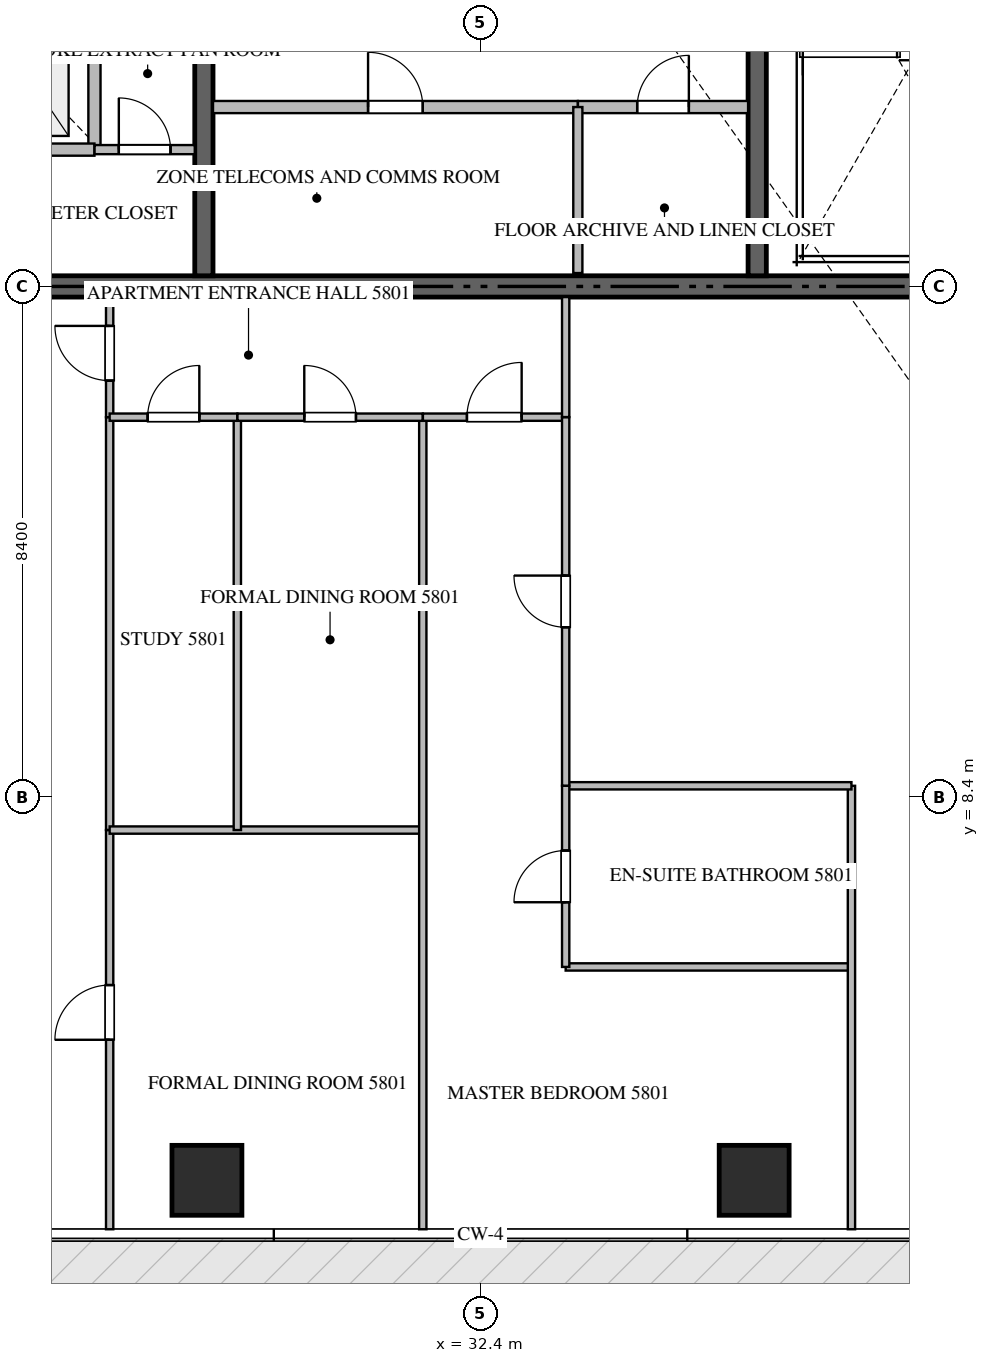
"""IFC4 building model, lengths in metres.
Left out: names, types, materials, properties, quantities, classifications, styles, units other than length and angle.
Written with IfcOpenShell. Run it as: python <this file> out.ifc"""

import sys

from ifc_helpers import new_model, si_unit, direction, frame, frame_2d, origin, origin_2d, place, context, subcontext, project, spatial, rectangle, extrude, source, transform, mapped, element, fill, save


model = new_model("IFC4")
c1 = context("Model", 3, precision=1e-05, world=origin(), true_north=direction((0.0, 1.0)))
c2 = subcontext(c1, "Body", "Model", "MODEL_VIEW")
j1 = project(units=[si_unit("LENGTHUNIT", "METRE"), si_unit("PLANEANGLEUNIT", "RADIAN")], contexts=[c1])
p1 = place(None, origin())
s1 = spatial("IfcSite", under=j1, at=p1, CompositionType="ELEMENT")
p2 = place(p1, origin())
s2 = spatial("IfcBuilding", under=s1, at=p2, CompositionType="ELEMENT")
p3 = place(p2, frame((0.0, 0.0, 233.55)))
s3 = spatial("IfcBuildingStorey", under=s2, at=p3, CompositionType="ELEMENT", Elevation=233.55)
p4 = place(p3, frame((23.4, 16.8, -0.26), z_axis=(0.0, 0.0, 1.0), x_axis=(1.0, 0.0, 0.0)))
e1 = element("IfcWall", 1, at=p4, inside=s3, PredefinedType="SHEAR", context=c2, shape_type="SweptSolid", body=[
    extrude(rectangle(XDim=18.0, YDim=0.35, at=frame_2d((9.0, 0.0))), origin(), (0.0, 0.0, 1.0), 3.848),
])
p5 = place(p3, frame((27.85, 16.975, -0.26), z_axis=(0.0, 0.0, 1.0), x_axis=(0.0, 1.0, 0.0)))
e2 = element("IfcWall", 2, at=p5, inside=s3, PredefinedType="SHEAR", context=c2, shape_type="SweptSolid", body=[
    extrude(rectangle(XDim=4.875, YDim=0.3, at=frame_2d((2.438, 0.0))), origin(), (0.0, 0.0, 1.0), 3.848),
])
p6 = place(p3, frame((36.95, 16.975, -0.26), z_axis=(0.0, 0.0, 1.0), x_axis=(0.0, 1.0, 0.0)))
e3 = element("IfcWall", 3, at=p6, inside=s3, PredefinedType="SHEAR", context=c2, shape_type="SweptSolid", body=[
    extrude(rectangle(XDim=8.375, YDim=0.3, at=frame_2d((4.188, 0.0))), origin(), (0.0, 0.0, 1.0), 3.848),
])
m1 = source(origin(), c2, "Body", "SweptSolid", [
    extrude(rectangle(XDim=1.15, YDim=1.15, at=origin_2d()), origin(), (0.0, 0.0, 1.0), 3.85),
])
for number, where, z_axis, x_axis in (
    (4, (27.9, 2.1, -0.26), (0.0, 0.0, 1.0), (1.0, 0.0, 0.0)),
    (5, (36.9, 2.1, -0.26), (0.0, 0.0, 1.0), (1.0, 0.0, 0.0)),
):
    element("IfcColumn", number, at=place(p3, frame(where, z_axis=z_axis, x_axis=x_axis)), inside=s3, PredefinedType="COLUMN", context=c2, shape_type="MappedRepresentation", body=[
        mapped(m1, transform((0.0, 0.0, 0.0), scale=1.0)),
    ])
p7 = place(p3, frame((26.05, 19.05, 0.0), z_axis=(0.0, 0.0, 1.0), x_axis=(0.0, 1.0, 0.0)))
e6 = element("IfcWall", 6, at=p7, inside=s3, PredefinedType="STANDARD", context=c2, shape_type="SweptSolid", body=[
    extrude(rectangle(XDim=2.5, YDim=0.2, at=frame_2d((1.25, 0.0))), origin(), (0.0, 0.0, 1.0), 3.59),
])
p8 = place(p3, frame((23.575, 19.05, 0.0), z_axis=(0.0, 0.0, 1.0), x_axis=(1.0, 0.0, 0.0)))
e7 = element("IfcWall", 7, at=p8, inside=s3, PredefinedType="STANDARD", context=c2, shape_type="SweptSolid", body=[
    extrude(rectangle(XDim=2.475, YDim=0.2, at=frame_2d((1.238, 0.0))), origin(), (0.0, 0.0, 1.0), 3.59),
])
p9 = place(p3, frame((26.052, 19.05, 0.0), z_axis=(0.0, 0.0, 1.0), x_axis=(1.0, 0.0, 0.0)))
e8 = element("IfcWall", 8, at=p9, inside=s3, PredefinedType="PARTITIONING", context=c2, shape_type="SweptSolid", body=[
    extrude(rectangle(XDim=1.648, YDim=0.15, at=frame_2d((0.824, 0.0))), origin(), (0.0, 0.0, 1.0), 3.59),
])
p10 = place(p9, frame((0.399, 0.0, 0.0)))
e9 = element("IfcOpeningElement", 9, at=p10, cuts=e8, PredefinedType="OPENING", context=c2, shape_type="SweptSolid", body=[
    extrude(rectangle(XDim=0.85, YDim=2.1, at=frame_2d((0.425, 1.05))), frame((0.0, 0.085, 0.0), z_axis=(0.0, -1.0, 0.0), x_axis=(1.0, 0.0, 0.0)), (0.0, 0.0, 1.0), 0.17),
])
p11 = place(p3, frame((28.0, 19.75, 0.0), z_axis=(0.0, 0.0, 1.0), x_axis=(1.0, 0.0, 0.0)))
e10 = element("IfcWall", 10, at=p11, inside=s3, PredefinedType="STANDARD", context=c2, shape_type="SweptSolid", body=[
    extrude(rectangle(XDim=6.0, YDim=0.2, at=frame_2d((3.0, 0.0))), origin(), (0.0, 0.0, 1.0), 3.59),
])
p12 = place(p11, frame((2.55, 0.0, 0.0)))
e11 = element("IfcOpeningElement", 11, at=p12, cuts=e10, PredefinedType="OPENING", context=c2, shape_type="SweptSolid", body=[
    extrude(rectangle(XDim=0.9, YDim=2.1, at=frame_2d((0.45, 1.05))), frame((0.0, 0.11, 0.0), z_axis=(0.0, -1.0, 0.0), x_axis=(1.0, 0.0, 0.0)), (0.0, 0.0, 1.0), 0.22),
])
p13 = place(p3, frame((34.002, 19.75, 0.0), z_axis=(0.0, 0.0, 1.0), x_axis=(1.0, 0.0, 0.0)))
e12 = element("IfcWall", 12, at=p13, inside=s3, PredefinedType="STANDARD", context=c2, shape_type="SweptSolid", body=[
    extrude(rectangle(XDim=2.798, YDim=0.2, at=frame_2d((1.399, 0.0))), origin(), (0.0, 0.0, 1.0), 3.59),
])
p14 = place(p13, frame((0.974, 0.0, 0.0)))
e13 = element("IfcOpeningElement", 13, at=p14, cuts=e12, PredefinedType="OPENING", context=c2, shape_type="SweptSolid", body=[
    extrude(rectangle(XDim=0.85, YDim=2.1, at=frame_2d((0.425, 1.05))), frame((0.0, 0.11, 0.0), z_axis=(0.0, -1.0, 0.0), x_axis=(1.0, 0.0, 0.0)), (0.0, 0.0, 1.0), 0.22),
])
p15 = place(p3, frame((34.0, 17.02, 0.0), z_axis=(0.0, 0.0, 1.0), x_axis=(0.0, 1.0, 0.0)))
e14 = element("IfcWall", 14, at=p15, inside=s3, PredefinedType="PARTITIONING", context=c2, shape_type="SweptSolid", body=[
    extrude(rectangle(XDim=2.73, YDim=0.15, at=frame_2d((1.365, 0.0))), origin(), (0.0, 0.0, 1.0), 3.59),
])
p16 = place(p3, frame((26.3, 14.65, 0.0), z_axis=(0.0, 0.0, 1.0), x_axis=(0.0, 1.0, 0.0)))
e15 = element("IfcWall", 15, at=p16, inside=s3, PredefinedType="PARTITIONING", context=c2, shape_type="SweptSolid", body=[
    extrude(rectangle(XDim=1.975, YDim=0.12, at=frame_2d((0.988, 0.0))), origin(), (0.0, 0.0, 1.0), 3.59),
])
p17 = place(p16, frame((0.601, 0.0, 0.0)))
e16 = element("IfcOpeningElement", 16, at=p17, cuts=e15, PredefinedType="OPENING", context=c2, shape_type="SweptSolid", body=[
    extrude(rectangle(XDim=0.9, YDim=2.1, at=frame_2d((0.45, 1.05))), frame((0.0, 0.07, 0.0), z_axis=(0.0, -1.0, 0.0), x_axis=(1.0, 0.0, 0.0)), (0.0, 0.0, 1.0), 0.14),
])
p18 = place(p3, frame((26.3, 1.295, 0.0), z_axis=(0.0, 0.0, 1.0), x_axis=(0.0, 1.0, 0.0)))
e17 = element("IfcWall", 17, at=p18, inside=s3, PredefinedType="PARTITIONING", context=c2, shape_type="SweptSolid", body=[
    extrude(rectangle(XDim=6.565, YDim=0.12, at=frame_2d((3.283, 0.0))), origin(), (0.0, 0.0, 1.0), 3.59),
])
p19 = place(p18, frame((3.116, 0.0, 0.0)))
e18 = element("IfcOpeningElement", 18, at=p19, cuts=e17, PredefinedType="OPENING", context=c2, shape_type="SweptSolid", body=[
    extrude(rectangle(XDim=0.9, YDim=2.1, at=frame_2d((0.45, 1.05))), frame((0.0, 0.07, 0.0), z_axis=(0.0, -1.0, 0.0), x_axis=(1.0, 0.0, 0.0)), (0.0, 0.0, 1.0), 0.14),
])
p20 = place(p3, frame((26.3, 7.862, 0.0), z_axis=(0.0, 0.0, 1.0), x_axis=(0.0, 1.0, 0.0)))
e19 = element("IfcWall", 19, at=p20, inside=s3, PredefinedType="PARTITIONING", context=c2, shape_type="SweptSolid", body=[
    extrude(rectangle(XDim=6.786, YDim=0.12, at=frame_2d((3.393, 0.0))), origin(), (0.0, 0.0, 1.0), 3.59),
])
p21 = place(p3, frame((26.3, 7.86, 0.0), z_axis=(0.0, 0.0, 1.0), x_axis=(1.0, 0.0, 0.0)))
e20 = element("IfcWall", 20, at=p21, inside=s3, PredefinedType="PARTITIONING", context=c2, shape_type="SweptSolid", body=[
    extrude(rectangle(XDim=5.15, YDim=0.12, at=frame_2d((2.575, 0.0))), origin(), (0.0, 0.0, 1.0), 3.59),
])
p22 = place(p3, frame((31.45, 1.295, 0.0), z_axis=(0.0, 0.0, 1.0), x_axis=(0.0, 1.0, 0.0)))
e21 = element("IfcWall", 21, at=p22, inside=s3, PredefinedType="PARTITIONING", context=c2, shape_type="SweptSolid", body=[
    extrude(rectangle(XDim=13.355, YDim=0.12, at=frame_2d((6.677, 0.0))), origin(), (0.0, 0.0, 1.0), 3.59),
])
p23 = place(p3, frame((28.4, 7.86, 0.0), z_axis=(0.0, 0.0, 1.0), x_axis=(0.0, 1.0, 0.0)))
e22 = element("IfcWall", 22, at=p23, inside=s3, PredefinedType="PARTITIONING", context=c2, shape_type="SweptSolid", body=[
    extrude(rectangle(XDim=6.79, YDim=0.12, at=frame_2d((3.395, 0.0))), origin(), (0.0, 0.0, 1.0), 3.59),
])
p24 = place(p3, frame((26.3, 14.65, 0.0), z_axis=(0.0, 0.0, 1.0), x_axis=(1.0, 0.0, 0.0)))
e23 = element("IfcWall", 23, at=p24, inside=s3, PredefinedType="PARTITIONING", context=c2, shape_type="SweptSolid", body=[
    extrude(rectangle(XDim=2.1, YDim=0.12, at=frame_2d((1.05, 0.0))), origin(), (0.0, 0.0, 1.0), 3.59),
])
p25 = place(p24, frame((0.625, 0.0, 0.0)))
e24 = element("IfcOpeningElement", 24, at=p25, cuts=e23, PredefinedType="OPENING", context=c2, shape_type="SweptSolid", body=[
    extrude(rectangle(XDim=0.85, YDim=2.1, at=frame_2d((0.425, 1.05))), frame((0.0, 0.07, 0.0), z_axis=(0.0, -1.0, 0.0), x_axis=(1.0, 0.0, 0.0)), (0.0, 0.0, 1.0), 0.14),
])
p26 = place(p3, frame((28.402, 14.65, 0.0), z_axis=(0.0, 0.0, 1.0), x_axis=(1.0, 0.0, 0.0)))
e25 = element("IfcWall", 25, at=p26, inside=s3, PredefinedType="PARTITIONING", context=c2, shape_type="SweptSolid", body=[
    extrude(rectangle(XDim=3.048, YDim=0.12, at=frame_2d((1.524, 0.0))), origin(), (0.0, 0.0, 1.0), 3.59),
])
p27 = place(p26, frame((1.099, 0.0, 0.0)))
e26 = element("IfcOpeningElement", 26, at=p27, cuts=e25, PredefinedType="OPENING", context=c2, shape_type="SweptSolid", body=[
    extrude(rectangle(XDim=0.85, YDim=2.1, at=frame_2d((0.425, 1.05))), frame((0.0, 0.07, 0.0), z_axis=(0.0, -1.0, 0.0), x_axis=(1.0, 0.0, 0.0)), (0.0, 0.0, 1.0), 0.14),
])
p28 = place(p3, frame((31.452, 14.65, 0.0), z_axis=(0.0, 0.0, 1.0), x_axis=(1.0, 0.0, 0.0)))
e27 = element("IfcWall", 27, at=p28, inside=s3, PredefinedType="PARTITIONING", context=c2, shape_type="SweptSolid", body=[
    extrude(rectangle(XDim=2.348, YDim=0.12, at=frame_2d((1.174, 0.0))), origin(), (0.0, 0.0, 1.0), 3.59),
])
p29 = place(p28, frame((0.724, 0.0, 0.0)))
e28 = element("IfcOpeningElement", 28, at=p29, cuts=e27, PredefinedType="OPENING", context=c2, shape_type="SweptSolid", body=[
    extrude(rectangle(XDim=0.9, YDim=2.1, at=frame_2d((0.45, 1.05))), frame((0.0, 0.07, 0.0), z_axis=(0.0, -1.0, 0.0), x_axis=(1.0, 0.0, 0.0)), (0.0, 0.0, 1.0), 0.14),
])
p30 = place(p3, frame((33.8, 5.609, 0.0), z_axis=(0.0, 0.0, 1.0), x_axis=(1.0, 0.0, 0.0)))
e29 = element("IfcWall", 29, at=p30, inside=s3, PredefinedType="PARTITIONING", context=c2, shape_type="SweptSolid", body=[
    extrude(rectangle(XDim=4.7, YDim=0.12, at=frame_2d((2.35, 0.0))), origin(), (0.0, 0.0, 1.0), 3.59),
])
p31 = place(p3, frame((38.5, 1.295, 0.0), z_axis=(0.0, 0.0, 1.0), x_axis=(0.0, 1.0, 0.0)))
e30 = element("IfcWall", 30, at=p31, inside=s3, PredefinedType="PARTITIONING", context=c2, shape_type="SweptSolid", body=[
    extrude(rectangle(XDim=7.293, YDim=0.12, at=frame_2d((3.646, 0.0))), origin(), (0.0, 0.0, 1.0), 3.59),
])
p32 = place(p3, frame((33.8, 8.588, 0.0), z_axis=(0.0, 0.0, 1.0), x_axis=(1.0, 0.0, 0.0)))
e31 = element("IfcWall", 31, at=p32, inside=s3, PredefinedType="PARTITIONING", context=c2, shape_type="SweptSolid", body=[
    extrude(rectangle(XDim=4.7, YDim=0.12, at=frame_2d((2.35, 0.0))), origin(), (0.0, 0.0, 1.0), 3.59),
])
p33 = place(p3, frame((33.8, 5.609, 0.0), z_axis=(0.0, 0.0, 1.0), x_axis=(0.0, 1.0, 0.0)))
e32 = element("IfcWall", 32, at=p33, inside=s3, PredefinedType="PARTITIONING", context=c2, shape_type="SweptSolid", body=[
    extrude(rectangle(XDim=2.979, YDim=0.12, at=frame_2d((1.49, 0.0))), origin(), (0.0, 0.0, 1.0), 3.59),
])
p34 = place(p33, frame((1.064, 0.0, 0.0)))
e33 = element("IfcOpeningElement", 33, at=p34, cuts=e32, PredefinedType="OPENING", context=c2, shape_type="SweptSolid", body=[
    extrude(rectangle(XDim=0.85, YDim=2.1, at=frame_2d((0.425, 1.05))), frame((0.0, 0.07, 0.0), z_axis=(0.0, -1.0, 0.0), x_axis=(1.0, 0.0, 0.0)), (0.0, 0.0, 1.0), 0.14),
])
p35 = place(p3, frame((33.8, 8.59, 0.0), z_axis=(0.0, 0.0, 1.0), x_axis=(0.0, 1.0, 0.0)))
e34 = element("IfcWall", 34, at=p35, inside=s3, PredefinedType="PARTITIONING", context=c2, shape_type="SweptSolid", body=[
    extrude(rectangle(XDim=6.06, YDim=0.12, at=frame_2d((3.03, 0.0))), origin(), (0.0, 0.0, 1.0), 3.59),
])
p36 = place(p35, frame((2.605, 0.0, 0.0)))
e35 = element("IfcOpeningElement", 35, at=p36, cuts=e34, PredefinedType="OPENING", context=c2, shape_type="SweptSolid", body=[
    extrude(rectangle(XDim=0.85, YDim=2.1, at=frame_2d((0.425, 1.05))), frame((0.0, 0.07, 0.0), z_axis=(0.0, -1.0, 0.0), x_axis=(1.0, 0.0, 0.0)), (0.0, 0.0, 1.0), 0.14),
])
p37 = place(p3, frame((33.8, 14.652, 0.0), z_axis=(0.0, 0.0, 1.0), x_axis=(0.0, 1.0, 0.0)))
e36 = element("IfcWall", 36, at=p37, inside=s3, PredefinedType="PARTITIONING", context=c2, shape_type="SweptSolid", body=[
    extrude(rectangle(XDim=1.973, YDim=0.12, at=frame_2d((0.986, 0.0))), origin(), (0.0, 0.0, 1.0), 3.59),
])
m2 = source(origin(), c2, "Body", "SweptSolid", [
    extrude(rectangle(XDim=0.85, YDim=2.1, at=frame_2d((0.425, 1.05))), frame((0.0, 0.025, 0.0), z_axis=(0.0, -1.0, 0.0), x_axis=(1.0, 0.0, 0.0)), (0.0, 0.0, 1.0), 0.05),
])
p38 = place(p10, origin())
e37 = element("IfcDoor", 37, at=p38, inside=s3, OperationType="SINGLE_SWING_LEFT", PredefinedType="DOOR", context=c2, shape_type="MappedRepresentation", body=[
    mapped(m2, transform((0.0, 0.0, 0.0), scale=1.0)),
])
fill(e9, e37)
m3 = source(origin(), c2, "Body", "SweptSolid", [
    extrude(rectangle(XDim=0.9, YDim=2.1, at=frame_2d((0.45, 1.05))), frame((0.0, 0.025, 0.0), z_axis=(0.0, -1.0, 0.0), x_axis=(1.0, 0.0, 0.0)), (0.0, 0.0, 1.0), 0.05),
])
p39 = place(p12, origin())
e38 = element("IfcDoor", 38, at=p39, inside=s3, OperationType="SINGLE_SWING_LEFT", PredefinedType="DOOR", context=c2, shape_type="MappedRepresentation", body=[
    mapped(m3, transform((0.0, 0.0, 0.0), scale=1.0)),
])
fill(e11, e38)
p40 = place(p14, origin())
e39 = element("IfcDoor", 39, at=p40, inside=s3, OperationType="SINGLE_SWING_RIGHT", PredefinedType="DOOR", context=c2, shape_type="MappedRepresentation", body=[
    mapped(m2, transform((0.0, 0.0, 0.0), scale=1.0)),
])
fill(e13, e39)
p41 = place(p17, origin())
e40 = element("IfcDoor", 40, at=p41, inside=s3, OperationType="SINGLE_SWING_RIGHT", PredefinedType="DOOR", context=c2, shape_type="MappedRepresentation", body=[
    mapped(m3, transform((0.0, 0.0, 0.0), scale=1.0)),
])
fill(e16, e40)
p42 = place(p19, origin())
e41 = element("IfcDoor", 41, at=p42, inside=s3, OperationType="SINGLE_SWING_LEFT", PredefinedType="DOOR", context=c2, shape_type="MappedRepresentation", body=[
    mapped(m3, transform((0.0, 0.0, 0.0), scale=1.0)),
])
fill(e18, e41)
p43 = place(p25, origin())
e42 = element("IfcDoor", 42, at=p43, inside=s3, OperationType="SINGLE_SWING_RIGHT", PredefinedType="DOOR", context=c2, shape_type="MappedRepresentation", body=[
    mapped(m2, transform((0.0, 0.0, 0.0), scale=1.0)),
])
fill(e24, e42)
p44 = place(p27, origin())
e43 = element("IfcDoor", 43, at=p44, inside=s3, OperationType="SINGLE_SWING_LEFT", PredefinedType="DOOR", context=c2, shape_type="MappedRepresentation", body=[
    mapped(m2, transform((0.0, 0.0, 0.0), scale=1.0)),
])
fill(e26, e43)
p45 = place(p29, origin())
e44 = element("IfcDoor", 44, at=p45, inside=s3, OperationType="SINGLE_SWING_RIGHT", PredefinedType="DOOR", context=c2, shape_type="MappedRepresentation", body=[
    mapped(m3, transform((0.0, 0.0, 0.0), scale=1.0)),
])
fill(e28, e44)
p46 = place(p34, origin())
e45 = element("IfcDoor", 45, at=p46, inside=s3, OperationType="SINGLE_SWING_LEFT", PredefinedType="DOOR", context=c2, shape_type="MappedRepresentation", body=[
    mapped(m2, transform((0.0, 0.0, 0.0), scale=1.0)),
])
fill(e33, e45)
p47 = place(p36, origin())
e46 = element("IfcDoor", 46, at=p47, inside=s3, OperationType="SINGLE_SWING_RIGHT", PredefinedType="DOOR", context=c2, shape_type="MappedRepresentation", body=[
    mapped(m2, transform((0.0, 0.0, 0.0), scale=1.0)),
])
fill(e35, e46)
save(model, sys.argv[1])
